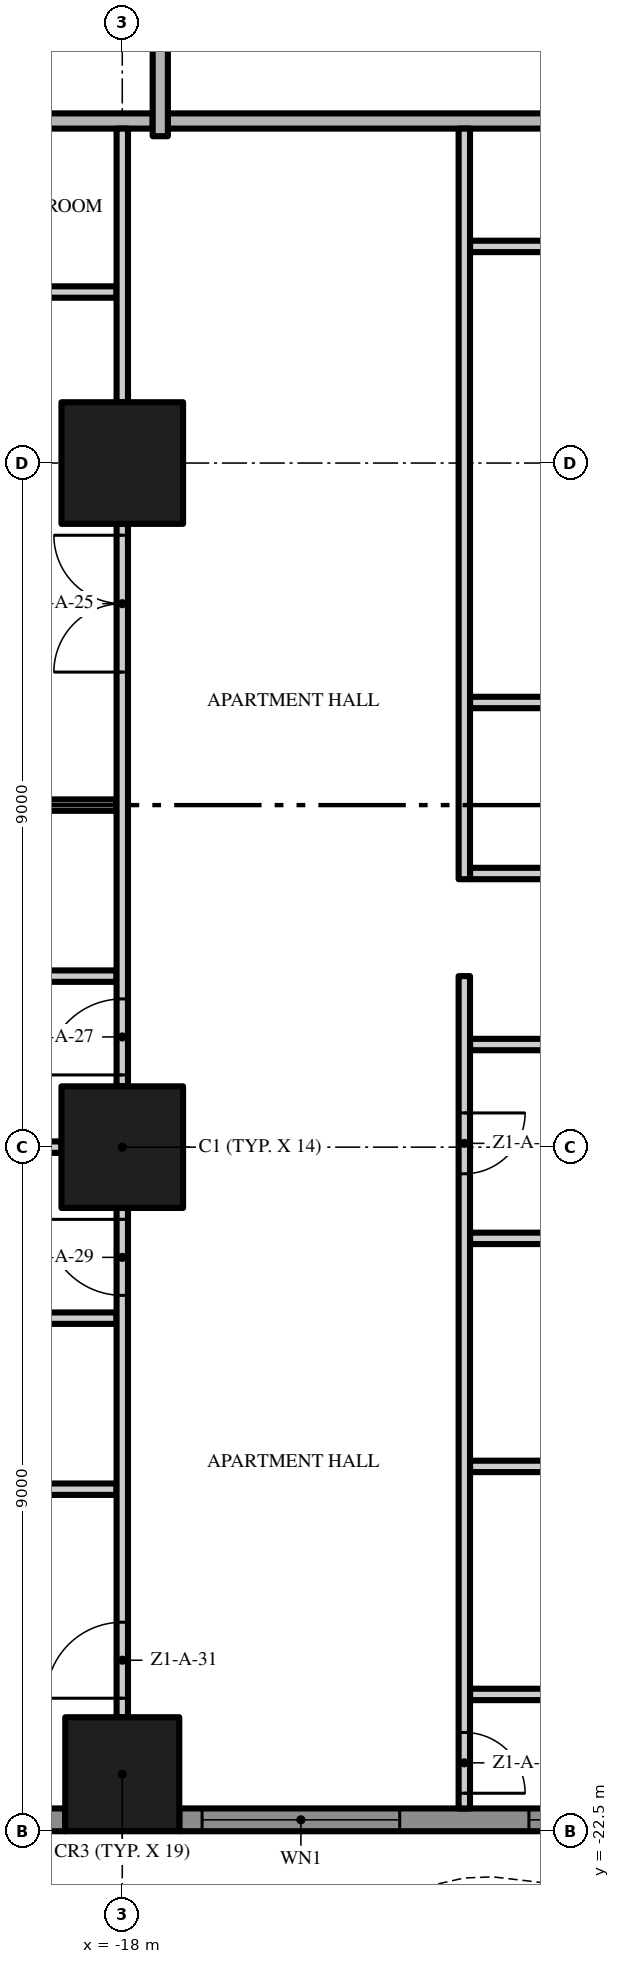
"""IFC4 building model, lengths in metres.
Left out: names, types, materials, properties, quantities, classifications, styles, units other than length and angle.
Written with IfcOpenShell. Run it as: python <this file> out.ifc"""

import sys

from ifc_helpers import new_model, si_unit, direction, frame, frame_2d, origin, origin_2d, place, context, subcontext, project, spatial, polyline, rectangle, outline, extrude, element, fill, save


model = new_model("IFC4")
c1 = context("Model", 3, precision=1e-05, world=origin(), true_north=direction((0.0, 1.0)))
c2 = subcontext(c1, "Body", "Model", "MODEL_VIEW")
j1 = project(units=[si_unit("LENGTHUNIT", "METRE"), si_unit("PLANEANGLEUNIT", "RADIAN")], contexts=[c1])
p1 = place(None, origin())
s1 = spatial("IfcSite", under=j1, at=p1, CompositionType="ELEMENT")
p2 = place(p1, origin())
s2 = spatial("IfcBuilding", under=s1, at=p2, CompositionType="ELEMENT")
p3 = place(p2, frame((0.0, 0.0, 18.8)))
s3 = spatial("IfcBuildingStorey", under=s2, at=p3, CompositionType="ELEMENT", Elevation=18.8)
p4 = place(p3, frame((-18.0, -13.5, 0.0), z_axis=(0.0, 0.0, 1.0), x_axis=(1.0, 0.0, 0.0)))
e1 = element("IfcColumn", 1, at=p4, inside=s3, PredefinedType="COLUMN", context=c2, shape_type="SweptSolid", body=[
    extrude(rectangle(XDim=1.6, YDim=1.6, at=origin_2d()), origin(), (0.0, 0.0, 1.0), 3.5),
])
p5 = place(p3, frame((-18.0, -21.75, 0.0), z_axis=(0.0, 0.0, 1.0), x_axis=(1.0, 0.0, 0.0)))
e2 = element("IfcColumn", 2, at=p5, inside=s3, PredefinedType="COLUMN", context=c2, shape_type="SweptSolid", body=[
    extrude(rectangle(XDim=1.5, YDim=1.5, at=origin_2d()), origin(), (0.0, 0.0, 1.0), 3.5),
])
p6 = place(p3, frame((-18.0, -4.5, 0.0), z_axis=(0.0, 0.0, 1.0), x_axis=(1.0, 0.0, 0.0)))
e3 = element("IfcColumn", 3, at=p6, inside=s3, PredefinedType="COLUMN", context=c2, shape_type="SweptSolid", body=[
    extrude(rectangle(XDim=1.6, YDim=1.6, at=origin_2d()), origin(), (0.0, 0.0, 1.0), 3.5),
])
p7 = place(p3, frame((-18.75, -22.35, 0.0), z_axis=(0.0, 0.0, 1.0), x_axis=(-1.0, 0.0, 0.0)))
e4 = element("IfcWall", 4, at=p7, inside=s3, PredefinedType="SOLIDWALL", context=c2, shape_type="SweptSolid", body=[
    extrude(rectangle(XDim=3.45, YDim=0.3, at=frame_2d((1.725, 0.0))), origin(), (0.0, 0.0, 1.0), 3.5),
])
p8 = place(p7, frame((0.3, 0.0, 0.0)))
e5 = element("IfcOpeningElement", 5, at=p8, cuts=e4, PredefinedType="OPENING", context=c2, shape_type="SweptSolid", body=[
    extrude(rectangle(XDim=2.6, YDim=2.4, at=frame_2d((1.3, 1.2))), frame((0.0, 0.16, 0.0), z_axis=(0.0, -1.0, 0.0), x_axis=(1.0, 0.0, 0.0)), (0.0, 0.0, 1.0), 0.32),
])
p9 = place(p3, frame((-9.75, -22.35, 0.0), z_axis=(0.0, 0.0, 1.0), x_axis=(-1.0, 0.0, 0.0)))
e6 = element("IfcWall", 6, at=p9, inside=s3, PredefinedType="SOLIDWALL", context=c2, shape_type="SweptSolid", body=[
    extrude(rectangle(XDim=7.5, YDim=0.3, at=frame_2d((3.75, 0.0))), origin(), (0.0, 0.0, 1.0), 3.5),
])
p10 = place(p9, frame((4.6, 0.0, 0.45)))
e7 = element("IfcOpeningElement", 7, at=p10, cuts=e6, PredefinedType="OPENING", context=c2, shape_type="SweptSolid", body=[
    extrude(rectangle(XDim=2.6, YDim=2.65, at=frame_2d((1.3, 1.325))), frame((0.0, 0.16, 0.0), z_axis=(0.0, -1.0, 0.0), x_axis=(1.0, 0.0, 0.0)), (0.0, 0.0, 1.0), 0.32),
])
p11 = place(p9, frame((0.3, 0.0, 0.45)))
e8 = element("IfcOpeningElement", 8, at=p11, cuts=e6, PredefinedType="OPENING", context=c2, shape_type="SweptSolid", body=[
    extrude(rectangle(XDim=2.6, YDim=2.65, at=frame_2d((1.3, 1.325))), frame((0.0, 0.16, 0.0), z_axis=(0.0, -1.0, 0.0), x_axis=(1.0, 0.0, 0.0)), (0.0, 0.0, 1.0), 0.32),
])
p12 = place(p3, origin())
e9 = element("IfcWall", 9, at=p12, inside=s3, PredefinedType="USERDEFINED", context=c2, shape_type="SweptSolid", body=[
    extrude(outline(polyline([(-22.5, -25.149), (-21.0, -25.485), (-20.625, -25.5), (-19.5, -25.369), (-18.0, -24.845), (-16.5, -24.112), (-15.0, -23.451), (-13.5, -23.115), (-13.125, -23.1), (-12.0, -23.231), (-10.5, -23.755), (-9.0, -24.488), (-7.5, -25.149), (-6.0, -25.485), (-5.625, -25.5), (-4.5, -25.369), (-3.0, -24.845), (-1.5, -24.112), (0.0, -23.451), (1.5, -23.115), (1.875, -23.1), (3.0, -23.231), (4.5, -23.755), (6.0, -24.488), (7.5, -25.149), (9.0, -25.485), (9.375, -25.5), (10.5, -25.369), (12.0, -24.845), (13.5, -24.112), (15.0, -23.451), (16.5, -23.115), (16.875, -23.1), (18.0, -23.231), (19.5, -23.755), (21.0, -24.488), (22.5, -25.149), (22.601, -24.92), (21.105, -24.261), (19.596, -23.524), (18.056, -22.986), (16.885, -22.849), (16.467, -22.866), (14.921, -23.213), (13.395, -23.885), (11.904, -24.614), (10.444, -25.124), (9.365, -25.249), (9.033, -25.236), (7.579, -24.91), (6.105, -24.261), (4.596, -23.524), (3.056, -22.986), (1.885, -22.849), (1.467, -22.866), (-0.079, -23.213), (-1.605, -23.885), (-3.096, -24.614), (-4.556, -25.124), (-5.635, -25.249), (-5.967, -25.236), (-7.421, -24.91), (-8.895, -24.261), (-10.404, -23.524), (-11.944, -22.986), (-13.115, -22.849), (-13.533, -22.866), (-15.079, -23.213), (-16.605, -23.885), (-18.096, -24.614), (-19.556, -25.124), (-20.635, -25.249), (-20.967, -25.236), (-22.445, -24.905), (-22.5, -25.149)])), origin(), (0.0, 0.0, 1.0), 0.9),
])
p13 = place(p3, frame((-13.425, -20.7, 0.0), z_axis=(0.0, 0.0, 1.0), x_axis=(1.0, 0.0, 0.0)))
e10 = element("IfcWall", 10, at=p13, inside=s3, PredefinedType="PARTITIONING", context=c2, shape_type="SweptSolid", body=[
    extrude(rectangle(XDim=4.35, YDim=0.15, at=frame_2d((2.175, 0.0))), origin(), (0.0, 0.0, 1.0), 3.5),
])
p14 = place(p3, frame((-21.75, -18.0, 0.0), z_axis=(0.0, 0.0, 1.0), x_axis=(1.0, 0.0, 0.0)))
e11 = element("IfcWall", 11, at=p14, inside=s3, PredefinedType="PARTITIONING", context=c2, shape_type="SweptSolid", body=[
    extrude(rectangle(XDim=3.675, YDim=0.15, at=frame_2d((1.837, 0.0))), origin(), (0.0, 0.0, 1.0), 3.5),
])
p15 = place(p3, frame((-13.425, -17.7, 0.0), z_axis=(0.0, 0.0, 1.0), x_axis=(1.0, 0.0, 0.0)))
e12 = element("IfcWall", 12, at=p15, inside=s3, PredefinedType="PARTITIONING", context=c2, shape_type="SweptSolid", body=[
    extrude(rectangle(XDim=4.35, YDim=0.15, at=frame_2d((2.175, 0.0))), origin(), (0.0, 0.0, 1.0), 3.5),
])
p16 = place(p3, frame((-20.925, -15.75, 0.0), z_axis=(0.0, 0.0, 1.0), x_axis=(1.0, 0.0, 0.0)))
e13 = element("IfcWall", 13, at=p16, inside=s3, PredefinedType="PARTITIONING", context=c2, shape_type="SweptSolid", body=[
    extrude(rectangle(XDim=2.85, YDim=0.15, at=frame_2d((1.425, 0.0))), origin(), (0.0, 0.0, 1.0), 3.5),
])
p17 = place(p3, frame((-13.425, -14.7, 0.0), z_axis=(0.0, 0.0, 1.0), x_axis=(1.0, 0.0, 0.0)))
e14 = element("IfcWall", 14, at=p17, inside=s3, PredefinedType="PARTITIONING", context=c2, shape_type="SweptSolid", body=[
    extrude(rectangle(XDim=4.35, YDim=0.15, at=frame_2d((2.175, 0.0))), origin(), (0.0, 0.0, 1.0), 3.5),
])
p18 = place(p3, frame((-25.5, -13.5, 0.0), z_axis=(0.0, 0.0, 1.0), x_axis=(1.0, 0.0, 0.0)))
e15 = element("IfcWall", 15, at=p18, inside=s3, PredefinedType="PARTITIONING", context=c2, shape_type="SweptSolid", body=[
    extrude(rectangle(XDim=6.7, YDim=0.15, at=frame_2d((3.35, 0.0))), origin(), (0.0, 0.0, 1.0), 3.5),
])
p19 = place(p3, frame((-13.425, -12.15, 0.0), z_axis=(0.0, 0.0, 1.0), x_axis=(1.0, 0.0, 0.0)))
e16 = element("IfcWall", 16, at=p19, inside=s3, PredefinedType="PARTITIONING", context=c2, shape_type="SweptSolid", body=[
    extrude(rectangle(XDim=4.35, YDim=0.15, at=frame_2d((2.175, 0.0))), origin(), (0.0, 0.0, 1.0), 3.5),
])
p20 = place(p3, frame((-20.925, -11.25, 0.0), z_axis=(0.0, 0.0, 1.0), x_axis=(1.0, 0.0, 0.0)))
e17 = element("IfcWall", 17, at=p20, inside=s3, PredefinedType="PARTITIONING", context=c2, shape_type="SweptSolid", body=[
    extrude(rectangle(XDim=2.85, YDim=0.15, at=frame_2d((1.425, 0.0))), origin(), (0.0, 0.0, 1.0), 3.5),
])
p21 = place(p3, frame((-13.425, -9.9, 0.0), z_axis=(0.0, 0.0, 1.0), x_axis=(1.0, 0.0, 0.0)))
e18 = element("IfcWall", 18, at=p21, inside=s3, PredefinedType="PARTITIONING", context=c2, shape_type="SweptSolid", body=[
    extrude(rectangle(XDim=4.35, YDim=0.15, at=frame_2d((2.175, 0.0))), origin(), (0.0, 0.0, 1.0), 3.5),
])
p22 = place(p21, frame((1.75, 0.0, 0.0)))
e19 = element("IfcOpeningElement", 19, at=p22, cuts=e18, PredefinedType="OPENING", context=c2, shape_type="SweptSolid", body=[
    extrude(rectangle(XDim=0.9, YDim=2.1, at=frame_2d((0.45, 1.05))), frame((0.0, 0.085, 0.0), z_axis=(0.0, -1.0, 0.0), x_axis=(1.0, 0.0, 0.0)), (0.0, 0.0, 1.0), 0.17),
])
p23 = place(p3, frame((-26.7, -9.0, 0.0), z_axis=(0.0, 0.0, 1.0), x_axis=(1.0, 0.0, 0.0)))
e20 = element("IfcWall", 20, at=p23, inside=s3, PredefinedType="PARTITIONING", context=c2, shape_type="SweptSolid", body=[
    extrude(rectangle(XDim=8.625, YDim=0.15, at=frame_2d((4.312, 0.0))), origin(), (0.0, 0.0, 1.0), 3.5),
])
p24 = place(p3, frame((-13.425, -7.65, 0.0), z_axis=(0.0, 0.0, 1.0), x_axis=(1.0, 0.0, 0.0)))
e21 = element("IfcWall", 21, at=p24, inside=s3, PredefinedType="PARTITIONING", context=c2, shape_type="SweptSolid", body=[
    extrude(rectangle(XDim=4.35, YDim=0.15, at=frame_2d((2.175, 0.0))), origin(), (0.0, 0.0, 1.0), 3.5),
])
p25 = place(p3, frame((-20.925, -2.25, 0.0), z_axis=(0.0, 0.0, 1.0), x_axis=(1.0, 0.0, 0.0)))
e22 = element("IfcWall", 22, at=p25, inside=s3, PredefinedType="PARTITIONING", context=c2, shape_type="SweptSolid", body=[
    extrude(rectangle(XDim=2.85, YDim=0.15, at=frame_2d((1.425, 0.0))), origin(), (0.0, 0.0, 1.0), 3.5),
])
p26 = place(p3, frame((-13.425, -1.65, 0.0), z_axis=(0.0, 0.0, 1.0), x_axis=(1.0, 0.0, 0.0)))
e23 = element("IfcWall", 23, at=p26, inside=s3, PredefinedType="PARTITIONING", context=c2, shape_type="SweptSolid", body=[
    extrude(rectangle(XDim=4.35, YDim=0.15, at=frame_2d((2.175, 0.0))), origin(), (0.0, 0.0, 1.0), 3.5),
])
p27 = place(p3, frame((-17.4, 0.0, 0.0), z_axis=(0.0, 0.0, 1.0), x_axis=(1.0, 0.0, 0.0)))
e24 = element("IfcWall", 24, at=p27, inside=s3, PredefinedType="PARTITIONING", context=c2, shape_type="SweptSolid", body=[
    extrude(rectangle(XDim=12.8, YDim=0.2, at=frame_2d((6.4, 0.0))), origin(), (0.0, 0.0, 1.0), 3.5),
])
p28 = place(p3, frame((-26.7, 0.0, 0.0), z_axis=(0.0, 0.0, 1.0), x_axis=(1.0, 0.0, 0.0)))
e25 = element("IfcWall", 25, at=p28, inside=s3, PredefinedType="PARTITIONING", context=c2, shape_type="SweptSolid", body=[
    extrude(rectangle(XDim=9.1, YDim=0.2, at=frame_2d((4.55, 0.0))), origin(), (0.0, 0.0, 1.0), 3.5),
])
p29 = place(p3, frame((-18.0, -21.0, 0.0), z_axis=(0.0, 0.0, 1.0), x_axis=(0.0, 1.0, 0.0)))
e26 = element("IfcWall", 26, at=p29, inside=s3, PredefinedType="PARTITIONING", context=c2, shape_type="SweptSolid", body=[
    extrude(rectangle(XDim=6.7, YDim=0.15, at=frame_2d((3.35, 0.0))), origin(), (0.0, 0.0, 1.0), 3.5),
])
p30 = place(p29, frame((5.55, 0.0, 0.0)))
e27 = element("IfcOpeningElement", 27, at=p30, cuts=e26, PredefinedType="OPENING", context=c2, shape_type="SweptSolid", body=[
    extrude(rectangle(XDim=1.0, YDim=2.4, at=frame_2d((0.5, 1.2))), frame((0.0, 0.085, 0.0), z_axis=(0.0, -1.0, 0.0), x_axis=(1.0, 0.0, 0.0)), (0.0, 0.0, 1.0), 0.17),
])
p31 = place(p29, frame((0.25, 0.0, 0.0)))
e28 = element("IfcOpeningElement", 28, at=p31, cuts=e26, PredefinedType="OPENING", context=c2, shape_type="SweptSolid", body=[
    extrude(rectangle(XDim=1.0, YDim=2.4, at=frame_2d((0.5, 1.2))), frame((0.0, 0.085, 0.0), z_axis=(0.0, -1.0, 0.0), x_axis=(1.0, 0.0, 0.0)), (0.0, 0.0, 1.0), 0.17),
])
p32 = place(p3, frame((-18.0, -12.7, 0.0), z_axis=(0.0, 0.0, 1.0), x_axis=(0.0, 1.0, 0.0)))
e29 = element("IfcWall", 29, at=p32, inside=s3, PredefinedType="PARTITIONING", context=c2, shape_type="SweptSolid", body=[
    extrude(rectangle(XDim=7.4, YDim=0.15, at=frame_2d((3.7, 0.0))), origin(), (0.0, 0.0, 1.0), 3.5),
])
p33 = place(p32, frame((5.45, 0.0, 0.0)))
e30 = element("IfcOpeningElement", 30, at=p33, cuts=e29, PredefinedType="OPENING", context=c2, shape_type="SweptSolid", body=[
    extrude(rectangle(XDim=1.8, YDim=2.4, at=frame_2d((0.9, 1.2))), frame((0.0, 0.085, 0.0), z_axis=(0.0, -1.0, 0.0), x_axis=(1.0, 0.0, 0.0)), (0.0, 0.0, 1.0), 0.17),
])
p34 = place(p32, frame((0.15, 0.0, 0.0)))
e31 = element("IfcOpeningElement", 31, at=p34, cuts=e29, PredefinedType="OPENING", context=c2, shape_type="SweptSolid", body=[
    extrude(rectangle(XDim=1.0, YDim=2.4, at=frame_2d((0.5, 1.2))), frame((0.0, 0.085, 0.0), z_axis=(0.0, -1.0, 0.0), x_axis=(1.0, 0.0, 0.0)), (0.0, 0.0, 1.0), 0.17),
])
p35 = place(p3, frame((-18.0, -3.7, 0.0), z_axis=(0.0, 0.0, 1.0), x_axis=(0.0, 1.0, 0.0)))
e32 = element("IfcWall", 32, at=p35, inside=s3, PredefinedType="PARTITIONING", context=c2, shape_type="SweptSolid", body=[
    extrude(rectangle(XDim=3.6, YDim=0.15, at=frame_2d((1.8, 0.0))), origin(), (0.0, 0.0, 1.0), 3.5),
])
p36 = place(p3, frame((-17.5, -0.2, 0.0), z_axis=(0.0, 0.0, 1.0), x_axis=(0.0, 1.0, 0.0)))
e33 = element("IfcWall", 33, at=p36, inside=s3, PredefinedType="PARTITIONING", context=c2, shape_type="SweptSolid", body=[
    extrude(rectangle(XDim=3.9, YDim=0.2, at=frame_2d((1.95, 0.0))), origin(), (0.0, 0.0, 1.0), 3.5),
])
p37 = place(p3, frame((-13.5, -11.25, 0.0), z_axis=(0.0, 0.0, 1.0), x_axis=(0.0, -1.0, 0.0)))
e34 = element("IfcWall", 34, at=p37, inside=s3, PredefinedType="PARTITIONING", context=c2, shape_type="SweptSolid", body=[
    extrude(rectangle(XDim=10.95, YDim=0.15, at=frame_2d((5.475, 0.0))), origin(), (0.0, 0.0, 1.0), 3.5),
])
p38 = place(p37, frame((1.8, 0.0, 0.0)))
e35 = element("IfcOpeningElement", 35, at=p38, cuts=e34, PredefinedType="OPENING", context=c2, shape_type="SweptSolid", body=[
    extrude(rectangle(XDim=0.8, YDim=2.0, at=frame_2d((0.4, 1.0))), frame((0.0, 0.085, 0.0), z_axis=(0.0, -1.0, 0.0), x_axis=(1.0, 0.0, 0.0)), (0.0, 0.0, 1.0), 0.17),
])
p39 = place(p37, frame((9.95, 0.0, 0.0)))
e36 = element("IfcOpeningElement", 36, at=p39, cuts=e34, PredefinedType="OPENING", context=c2, shape_type="SweptSolid", body=[
    extrude(rectangle(XDim=0.8, YDim=2.0, at=frame_2d((0.4, 1.0))), frame((0.0, 0.085, 0.0), z_axis=(0.0, -1.0, 0.0), x_axis=(1.0, 0.0, 0.0)), (0.0, 0.0, 1.0), 0.17),
])
p40 = place(p3, frame((-13.5, -9.975, 0.0), z_axis=(0.0, 0.0, 1.0), x_axis=(0.0, 1.0, 0.0)))
e37 = element("IfcWall", 37, at=p40, inside=s3, PredefinedType="PARTITIONING", context=c2, shape_type="SweptSolid", body=[
    extrude(rectangle(XDim=9.875, YDim=0.15, at=frame_2d((4.938, 0.0))), origin(), (0.0, 0.0, 1.0), 3.5),
])
p41 = place(p10, origin())
e38 = element("IfcWindow", 38, at=p41, inside=s3, PartitioningType="SINGLE_PANEL", PredefinedType="WINDOW", context=c2, shape_type="SweptSolid", body=[
    extrude(rectangle(XDim=2.6, YDim=2.65, at=frame_2d((1.3, 1.325))), frame((0.0, 0.03, 0.0), z_axis=(0.0, -1.0, 0.0), x_axis=(1.0, 0.0, 0.0)), (0.0, 0.0, 1.0), 0.06),
])
fill(e7, e38)
p42 = place(p11, origin())
e39 = element("IfcWindow", 39, at=p42, inside=s3, PartitioningType="SINGLE_PANEL", PredefinedType="WINDOW", context=c2, shape_type="SweptSolid", body=[
    extrude(rectangle(XDim=2.6, YDim=2.65, at=frame_2d((1.3, 1.325))), frame((0.0, 0.03, 0.0), z_axis=(0.0, -1.0, 0.0), x_axis=(1.0, 0.0, 0.0)), (0.0, 0.0, 1.0), 0.06),
])
fill(e8, e39)
p43 = place(p38, origin())
e40 = element("IfcDoor", 40, at=p43, inside=s3, OperationType="SINGLE_SWING_LEFT", PredefinedType="DOOR", context=c2, shape_type="SweptSolid", body=[
    extrude(rectangle(XDim=0.8, YDim=2.0, at=frame_2d((0.4, 1.0))), frame((0.0, 0.025, 0.0), z_axis=(0.0, -1.0, 0.0), x_axis=(1.0, 0.0, 0.0)), (0.0, 0.0, 1.0), 0.05),
])
fill(e35, e40)
p44 = place(p39, origin())
e41 = element("IfcDoor", 41, at=p44, inside=s3, OperationType="SINGLE_SWING_RIGHT", PredefinedType="DOOR", context=c2, shape_type="SweptSolid", body=[
    extrude(rectangle(XDim=0.8, YDim=2.0, at=frame_2d((0.4, 1.0))), frame((0.0, 0.025, 0.0), z_axis=(0.0, -1.0, 0.0), x_axis=(1.0, 0.0, 0.0)), (0.0, 0.0, 1.0), 0.05),
])
fill(e36, e41)
p45 = place(p33, origin())
e42 = element("IfcDoor", 42, at=p45, inside=s3, OperationType="DOUBLE_DOOR_SINGLE_SWING", PredefinedType="DOOR", context=c2, shape_type="SweptSolid", body=[
    extrude(rectangle(XDim=1.8, YDim=2.4, at=frame_2d((0.9, 1.2))), frame((0.0, 0.025, 0.0), z_axis=(0.0, -1.0, 0.0), x_axis=(1.0, 0.0, 0.0)), (0.0, 0.0, 1.0), 0.05),
])
fill(e30, e42)
p46 = place(p34, origin())
e43 = element("IfcDoor", 43, at=p46, inside=s3, OperationType="SINGLE_SWING_LEFT", PredefinedType="DOOR", context=c2, shape_type="SweptSolid", body=[
    extrude(rectangle(XDim=1.0, YDim=2.4, at=frame_2d((0.5, 1.2))), frame((0.0, 0.025, 0.0), z_axis=(0.0, -1.0, 0.0), x_axis=(1.0, 0.0, 0.0)), (0.0, 0.0, 1.0), 0.05),
])
fill(e31, e43)
p47 = place(p30, origin())
e44 = element("IfcDoor", 44, at=p47, inside=s3, OperationType="SINGLE_SWING_RIGHT", PredefinedType="DOOR", context=c2, shape_type="SweptSolid", body=[
    extrude(rectangle(XDim=1.0, YDim=2.4, at=frame_2d((0.5, 1.2))), frame((0.0, 0.025, 0.0), z_axis=(0.0, -1.0, 0.0), x_axis=(1.0, 0.0, 0.0)), (0.0, 0.0, 1.0), 0.05),
])
fill(e27, e44)
p48 = place(p31, origin())
e45 = element("IfcDoor", 45, at=p48, inside=s3, OperationType="SINGLE_SWING_LEFT", PredefinedType="DOOR", context=c2, shape_type="SweptSolid", body=[
    extrude(rectangle(XDim=1.0, YDim=2.4, at=frame_2d((0.5, 1.2))), frame((0.0, 0.025, 0.0), z_axis=(0.0, -1.0, 0.0), x_axis=(1.0, 0.0, 0.0)), (0.0, 0.0, 1.0), 0.05),
])
fill(e28, e45)
save(model, sys.argv[1])
